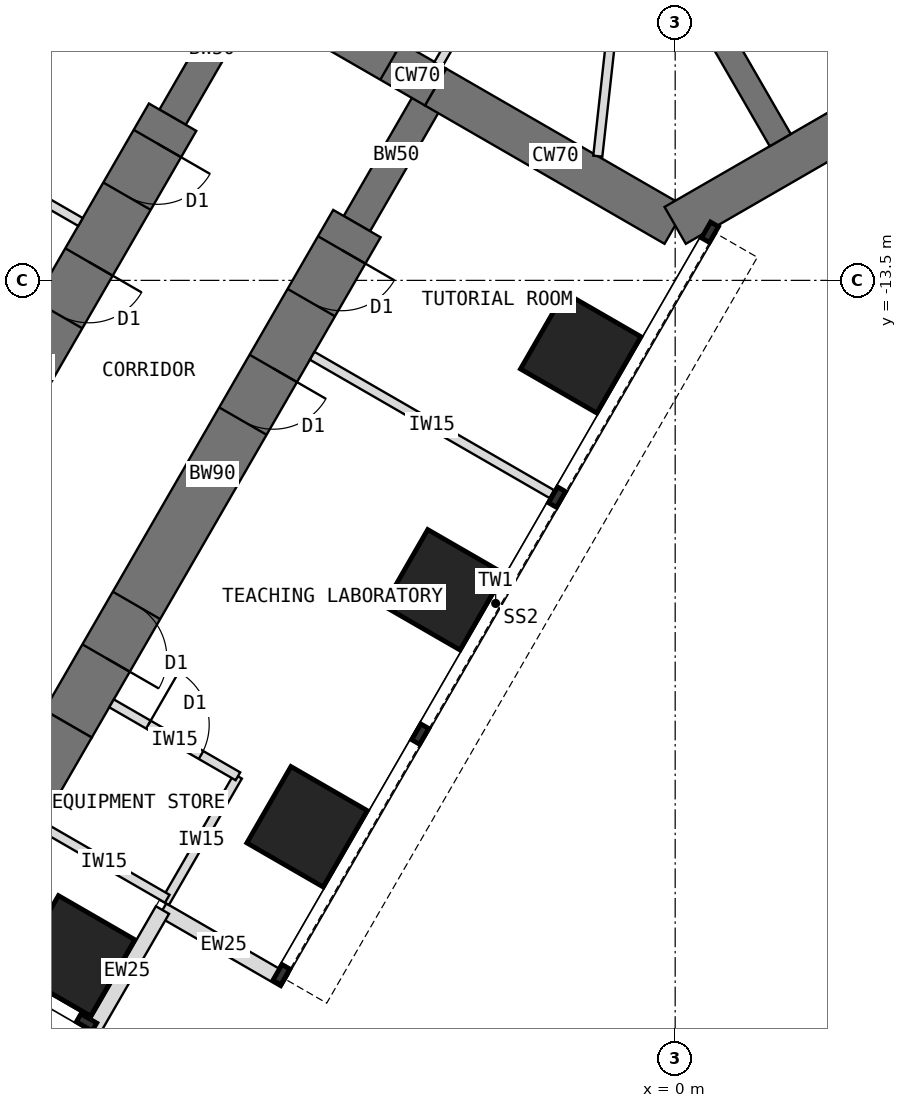
"""IFC4 building model, lengths in metres.
Left out: names, types, materials, properties, quantities, classifications, styles, units other than length and angle.
Written with IfcOpenShell. Run it as: python <this file> out.ifc"""

import sys

from ifc_helpers import new_model, si_unit, direction, frame, frame_2d, origin, origin_2d, place, context, subcontext, project, spatial, rectangle, extrude, element, fill, save


model = new_model("IFC4")
c1 = context("Model", 3, precision=1e-05, world=origin(), true_north=direction((0.0, 1.0)))
c2 = subcontext(c1, "Body", "Model", "MODEL_VIEW")
j1 = project(units=[si_unit("LENGTHUNIT", "METRE"), si_unit("PLANEANGLEUNIT", "RADIAN")], contexts=[c1])
p1 = place(None, origin())
s1 = spatial("IfcSite", under=j1, at=p1, CompositionType="ELEMENT")
p2 = place(p1, origin())
s2 = spatial("IfcBuilding", under=s1, at=p2, CompositionType="ELEMENT")
p3 = place(p2, frame((0.0, 0.0, 48.5)))
s3 = spatial("IfcBuildingStorey", under=s2, at=p3, CompositionType="ELEMENT", Elevation=48.5)
p4 = place(p3, frame((-6.97, -8.572, 0.0), z_axis=(0.0, 0.0, 1.0), x_axis=(0.866019471182, -0.500010275428, 0.0)))
e1 = element("IfcWall", 1, at=p4, inside=s3, PredefinedType="SHEAR", context=c2, shape_type="SweptSolid", body=[
    extrude(rectangle(XDim=3.5, YDim=0.7, at=frame_2d((1.75, 0.0))), origin(), (0.0, 0.0, 1.0), 4.0),
])
p5 = place(p4, frame((0.85, 0.0, 0.0)))
e2 = element("IfcOpeningElement", 2, at=p5, cuts=e1, PredefinedType="OPENING", context=c2, shape_type="SweptSolid", body=[
    extrude(rectangle(XDim=1.8, YDim=2.1, at=frame_2d((0.9, 1.05))), frame((0.0, 0.36, 0.0), z_axis=(0.0, -1.0, 0.0), x_axis=(1.0, 0.0, 0.0)), (0.0, 0.0, 1.0), 0.72),
])
p6 = place(p3, frame((-3.939, -10.322, 0.0), z_axis=(0.0, 0.0, 1.0), x_axis=(0.866011268655, -0.500024481964, 0.0)))
e3 = element("IfcWall", 3, at=p6, inside=s3, PredefinedType="SHEAR", context=c2, shape_type="SweptSolid", body=[
    extrude(rectangle(XDim=4.548, YDim=0.7, at=frame_2d((2.274, 0.0))), origin(), (0.0, 0.0, 1.0), 4.0),
])
p7 = place(p3, frame((0.0, -12.596, 0.0), z_axis=(0.0, 0.0, 1.0), x_axis=(0.866021940709, 0.500005998175, 0.0)))
e4 = element("IfcWall", 4, at=p7, inside=s3, PredefinedType="SHEAR", context=c2, shape_type="SweptSolid", body=[
    extrude(rectangle(XDim=12.596, YDim=0.7, at=frame_2d((6.298, 0.0))), origin(), (0.0, 0.0, 1.0), 4.0),
])
p8 = place(p3, frame((-3.939, -10.322, 0.0), z_axis=(0.0, 0.0, 1.0), x_axis=(-0.499918158782, -0.866072649678, 0.0)))
e5 = element("IfcWall", 5, at=p8, inside=s3, PredefinedType="SHEAR", context=c2, shape_type="SweptSolid", body=[
    extrude(rectangle(XDim=2.592, YDim=0.5, at=frame_2d((1.296, 0.0))), origin(), (0.0, 0.0, 1.0), 4.0),
])
p9 = place(p3, frame((-5.234, -12.566, 0.0), z_axis=(0.0, 0.0, 1.0), x_axis=(-0.499997557548, -0.86602681393, 0.0)))
e6 = element("IfcWall", 6, at=p9, inside=s3, PredefinedType="SHEAR", context=c2, shape_type="SweptSolid", body=[
    extrude(rectangle(XDim=9.5, YDim=0.9, at=frame_2d((4.75, 0.0))), origin(), (0.0, 0.0, 1.0), 4.0),
])
p10 = place(p9, frame((0.5, 0.0, 0.0)))
e7 = element("IfcOpeningElement", 7, at=p10, cuts=e6, PredefinedType="OPENING", context=c2, shape_type="SweptSolid", body=[
    extrude(rectangle(XDim=1.0, YDim=2.1, at=frame_2d((0.5, 1.05))), frame((0.0, 0.46, 0.0), z_axis=(0.0, -1.0, 0.0), x_axis=(1.0, 0.0, 0.0)), (0.0, 0.0, 1.0), 0.92),
])
p11 = place(p9, frame((2.75, 0.0, 0.0)))
e8 = element("IfcOpeningElement", 8, at=p11, cuts=e6, PredefinedType="OPENING", context=c2, shape_type="SweptSolid", body=[
    extrude(rectangle(XDim=1.0, YDim=2.1, at=frame_2d((0.5, 1.05))), frame((0.0, 0.46, 0.0), z_axis=(0.0, -1.0, 0.0), x_axis=(1.0, 0.0, 0.0)), (0.0, 0.0, 1.0), 0.92),
])
p12 = place(p9, frame((7.25, 0.0, 0.0)))
e9 = element("IfcOpeningElement", 9, at=p12, cuts=e6, PredefinedType="OPENING", context=c2, shape_type="SweptSolid", body=[
    extrude(rectangle(XDim=1.0, YDim=2.1, at=frame_2d((0.5, 1.05))), frame((0.0, 0.46, 0.0), z_axis=(0.0, -1.0, 0.0), x_axis=(1.0, 0.0, 0.0)), (0.0, 0.0, 1.0), 0.92),
])
p13 = place(p3, frame((-9.984, -20.794, 0.0), z_axis=(0.0, 0.0, 1.0), x_axis=(-0.500042316284, -0.866000971088, 0.0)))
e10 = element("IfcWall", 10, at=p13, inside=s3, PredefinedType="SHEAR", context=c2, shape_type="SweptSolid", body=[
    extrude(rectangle(XDim=3.7, YDim=0.9, at=frame_2d((1.85, 0.0))), origin(), (0.0, 0.0, 1.0), 4.0),
])
p14 = place(p3, frame((-6.97, -8.572, 0.0), z_axis=(0.0, 0.0, 1.0), x_axis=(-0.499988811324, -0.866031863473, 0.0)))
e11 = element("IfcWall", 11, at=p14, inside=s3, PredefinedType="SHEAR", context=c2, shape_type="SweptSolid", body=[
    extrude(rectangle(XDim=2.592, YDim=0.5, at=frame_2d((1.296, 0.0))), origin(), (0.0, 0.0, 1.0), 4.0),
])
p15 = place(p3, frame((-8.266, -10.816, 0.0), z_axis=(0.0, 0.0, 1.0), x_axis=(-0.499997557548, -0.86602681393, 0.0)))
e12 = element("IfcWall", 12, at=p15, inside=s3, PredefinedType="SHEAR", context=c2, shape_type="SweptSolid", body=[
    extrude(rectangle(XDim=9.5, YDim=0.9, at=frame_2d((4.75, 0.0))), origin(), (0.0, 0.0, 1.0), 4.0),
])
p16 = place(p15, frame((0.5, 0.0, 0.0)))
e13 = element("IfcOpeningElement", 13, at=p16, cuts=e12, PredefinedType="OPENING", context=c2, shape_type="SweptSolid", body=[
    extrude(rectangle(XDim=1.0, YDim=2.1, at=frame_2d((0.5, 1.05))), frame((0.0, 0.46, 0.0), z_axis=(0.0, -1.0, 0.0), x_axis=(1.0, 0.0, 0.0)), (0.0, 0.0, 1.0), 0.92),
])
p17 = place(p15, frame((2.75, 0.0, 0.0)))
e14 = element("IfcOpeningElement", 14, at=p17, cuts=e12, PredefinedType="OPENING", context=c2, shape_type="SweptSolid", body=[
    extrude(rectangle(XDim=1.0, YDim=2.1, at=frame_2d((0.5, 1.05))), frame((0.0, 0.46, 0.0), z_axis=(0.0, -1.0, 0.0), x_axis=(1.0, 0.0, 0.0)), (0.0, 0.0, 1.0), 0.92),
])
p18 = place(p15, frame((7.25, 0.0, 0.0)))
e15 = element("IfcOpeningElement", 15, at=p18, cuts=e12, PredefinedType="OPENING", context=c2, shape_type="SweptSolid", body=[
    extrude(rectangle(XDim=1.0, YDim=2.1, at=frame_2d((0.5, 1.05))), frame((0.0, 0.46, 0.0), z_axis=(0.0, -1.0, 0.0), x_axis=(1.0, 0.0, 0.0)), (0.0, 0.0, 1.0), 0.92),
])
for number, where, z_axis, x_axis in (
    (16, (-1.554, -14.691, 0.0), (0.0, 0.0, 1.0), (0.5, 0.866, 0.0)),
    (17, (-3.804, -18.588, 0.0), (0.0, 0.0, 1.0), (0.5, 0.866, 0.0)),
    (18, (-6.054, -22.486, 0.0), (0.0, 0.0, 1.0), (0.5, 0.866, 0.0)),
    (19, (-9.877, -24.608, 0.0), (0.0, 0.0, 1.0), (0.5, 0.866, 0.0)),
):
    element("IfcColumn", number, at=place(p3, frame(where, z_axis=z_axis, x_axis=x_axis)), inside=s3, PredefinedType="COLUMN", context=c2, shape_type="SweptSolid", body=[
        extrude(rectangle(XDim=1.45, YDim=1.45, at=origin_2d()), origin(), (0.0, 0.0, 1.0), 4.0),
    ])
for number, where, z_axis, x_axis in (
    (20, (-6.419, -25.017, 0.0), (0.0, 0.0, 1.0), (-0.866, 0.5, 0.0)),
    (21, (-8.432, -23.855, 0.0), (0.0, 0.0, 1.0), (-0.5, -0.866, 0.0)),
):
    element("IfcWall", number, at=place(p3, frame(where, z_axis=z_axis, x_axis=x_axis)), inside=s3, PredefinedType="STANDARD", context=c2, shape_type="SweptSolid", body=[
        extrude(rectangle(XDim=2.325, YDim=0.25, at=frame_2d((1.163, 0.0))), origin(), (0.0, 0.0, 1.0), 3.8),
    ])
p19 = place(p3, frame((-1.201, -6.12, 0.0), z_axis=(0.0, 0.0, 1.0), x_axis=(0.500002627198, -0.866023886965, 0.0)))
e22 = element("IfcWall", 22, at=p19, inside=s3, PredefinedType="SHEAR", context=c2, shape_type="SweptSolid", body=[
    extrude(rectangle(XDim=5.858, YDim=0.4, at=frame_2d((2.929, 0.0))), origin(), (0.0, 0.0, 1.0), 4.0),
])
p20 = place(p3, frame((-5.97, -14.74, 0.0), z_axis=(0.0, 0.0, 1.0), x_axis=(0.866035472144, -0.499982560684, 0.0)))
e23 = element("IfcWall", 23, at=p20, inside=s3, PredefinedType="PARTITIONING", context=c2, shape_type="SweptSolid", body=[
    extrude(rectangle(XDim=4.55, YDim=0.15, at=frame_2d((2.275, 0.0))), origin(), (0.0, 0.0, 1.0), 3.8),
])
p21 = place(p3, frame((-7.191, -21.656, 0.0), z_axis=(0.0, 0.0, 1.0), x_axis=(-0.500077600433, -0.865980596518, 0.0)))
e24 = element("IfcWall", 24, at=p21, inside=s3, PredefinedType="PARTITIONING", context=c2, shape_type="SweptSolid", body=[
    extrude(rectangle(XDim=2.4, YDim=0.15, at=frame_2d((1.2, 0.0))), origin(), (0.0, 0.0, 1.0), 3.8),
])
p22 = place(p3, frame((-9.27, -20.456, 0.0), z_axis=(0.0, 0.0, 1.0), x_axis=(0.866006032174, -0.500033551112, 0.0)))
e25 = element("IfcWall", 25, at=p22, inside=s3, PredefinedType="PARTITIONING", context=c2, shape_type="SweptSolid", body=[
    extrude(rectangle(XDim=2.4, YDim=0.15, at=frame_2d((1.2, 0.0))), origin(), (0.0, 0.0, 1.0), 3.8),
])
p23 = place(p22, frame((0.7, 0.0, 0.0)))
e26 = element("IfcOpeningElement", 26, at=p23, cuts=e25, PredefinedType="OPENING", context=c2, shape_type="SweptSolid", body=[
    extrude(rectangle(XDim=1.0, YDim=2.1, at=frame_2d((0.5, 1.05))), frame((0.0, 0.085, 0.0), z_axis=(0.0, -1.0, 0.0), x_axis=(1.0, 0.0, 0.0)), (0.0, 0.0, 1.0), 0.17),
])
p24 = place(p3, frame((-10.432, -22.469, 0.0), z_axis=(0.0, 0.0, 1.0), x_axis=(0.866024647952, -0.500001309137, 0.0)))
e27 = element("IfcWall", 27, at=p24, inside=s3, PredefinedType="PARTITIONING", context=c2, shape_type="SweptSolid", body=[
    extrude(rectangle(XDim=2.4, YDim=0.15, at=frame_2d((1.2, 0.0))), origin(), (0.0, 0.0, 1.0), 3.8),
])
p25 = place(p3, frame((-9.78, -12.54, 0.0), z_axis=(0.0, 0.0, 1.0), x_axis=(-0.866035472144, 0.499982560684, 0.0)))
e28 = element("IfcWall", 28, at=p25, inside=s3, PredefinedType="PARTITIONING", context=c2, shape_type="SweptSolid", body=[
    extrude(rectangle(XDim=4.55, YDim=0.15, at=frame_2d((2.275, 0.0))), origin(), (0.0, 0.0, 1.0), 3.8),
])
p26 = place(p3, frame((-1.664, -6.083, 0.0), z_axis=(0.0, 0.0, 1.0), x_axis=(-0.499999927604, -0.866025445582, 0.0)))
e29 = element("IfcWall", 29, at=p26, inside=s3, PredefinedType="PARTITIONING", context=c2, shape_type="SweptSolid", body=[
    extrude(rectangle(XDim=4.468, YDim=0.15, at=frame_2d((2.234, 0.0))), origin(), (0.0, 0.0, 1.0), 3.8),
])
p27 = place(p26, frame((1.744, 0.0, 0.0)))
e30 = element("IfcOpeningElement", 30, at=p27, cuts=e29, PredefinedType="OPENING", context=c2, shape_type="SweptSolid", body=[
    extrude(rectangle(XDim=1.0, YDim=2.1, at=frame_2d((0.5, 1.05))), frame((0.0, 0.085, 0.0), z_axis=(0.0, -1.0, 0.0), x_axis=(1.0, 0.0, 0.0)), (0.0, 0.0, 1.0), 0.17),
])
p28 = place(p3, frame((-0.764, -6.877, 0.0), z_axis=(0.0, 0.0, 1.0), x_axis=(-0.110408266965, -0.993886318744, 0.0)))
e31 = element("IfcWall", 31, at=p28, inside=s3, PredefinedType="PARTITIONING", context=c2, shape_type="SweptSolid", body=[
    extrude(rectangle(XDim=4.608, YDim=0.15, at=frame_2d((2.304, 0.0))), origin(), (0.0, 0.0, 1.0), 3.8),
])
p29 = place(p28, frame((1.804, 0.0, 0.0)))
e32 = element("IfcOpeningElement", 32, at=p29, cuts=e31, PredefinedType="OPENING", context=c2, shape_type="SweptSolid", body=[
    extrude(rectangle(XDim=1.0, YDim=2.1, at=frame_2d((0.5, 1.05))), frame((0.0, 0.085, 0.0), z_axis=(0.0, -1.0, 0.0), x_axis=(1.0, 0.0, 0.0)), (0.0, 0.0, 1.0), 0.17),
])
p30 = place(p5, origin())
e33 = element("IfcDoor", 33, at=p30, inside=s3, OperationType="DOUBLE_DOOR_DOUBLE_SWING", PredefinedType="DOOR", context=c2, shape_type="SweptSolid", body=[
    extrude(rectangle(XDim=1.72, YDim=2.06, at=frame_2d((0.9, 1.03))), frame((0.0, 0.025, 0.0), z_axis=(0.0, -1.0, 0.0), x_axis=(1.0, 0.0, 0.0)), (0.0, 0.0, 1.0), 0.05),
    extrude(rectangle(XDim=0.04, YDim=2.1, at=frame_2d((0.02, 1.05))), frame((0.0, 0.35, 0.0), z_axis=(0.0, -1.0, 0.0), x_axis=(1.0, 0.0, 0.0)), (0.0, 0.0, 1.0), 0.699),
    extrude(rectangle(XDim=0.04, YDim=2.1, at=frame_2d((1.78, 1.05))), frame((0.0, 0.35, 0.0), z_axis=(0.0, -1.0, 0.0), x_axis=(1.0, 0.0, 0.0)), (0.0, 0.0, 1.0), 0.699),
    extrude(rectangle(XDim=1.72, YDim=0.04, at=frame_2d((0.9, 2.08))), frame((0.0, 0.35, 0.0), z_axis=(0.0, -1.0, 0.0), x_axis=(1.0, 0.0, 0.0)), (0.0, 0.0, 1.0), 0.699),
])
fill(e2, e33)
p31 = place(p23, origin())
e34 = element("IfcDoor", 34, at=p31, inside=s3, OperationType="SINGLE_SWING_LEFT", PredefinedType="DOOR", context=c2, shape_type="SweptSolid", body=[
    extrude(rectangle(XDim=1.0, YDim=2.1, at=frame_2d((0.5, 1.05))), frame((0.0, 0.025, 0.0), z_axis=(0.0, -1.0, 0.0), x_axis=(1.0, 0.0, 0.0)), (0.0, 0.0, 1.0), 0.05),
])
fill(e26, e34)
p32 = place(p10, origin())
e35 = element("IfcDoor", 35, at=p32, inside=s3, OperationType="SINGLE_SWING_LEFT", PredefinedType="DOOR", context=c2, shape_type="SweptSolid", body=[
    extrude(rectangle(XDim=0.92, YDim=2.06, at=frame_2d((0.5, 1.03))), frame((0.0, 0.025, 0.0), z_axis=(0.0, -1.0, 0.0), x_axis=(1.0, 0.0, 0.0)), (0.0, 0.0, 1.0), 0.05),
    extrude(rectangle(XDim=0.04, YDim=2.1, at=frame_2d((0.02, 1.05))), frame((0.0, 0.45, 0.0), z_axis=(0.0, -1.0, 0.0), x_axis=(1.0, 0.0, 0.0)), (0.0, 0.0, 1.0), 0.899),
    extrude(rectangle(XDim=0.04, YDim=2.1, at=frame_2d((0.98, 1.05))), frame((0.0, 0.45, 0.0), z_axis=(0.0, -1.0, 0.0), x_axis=(1.0, 0.0, 0.0)), (0.0, 0.0, 1.0), 0.899),
    extrude(rectangle(XDim=0.92, YDim=0.04, at=frame_2d((0.5, 2.08))), frame((0.0, 0.45, 0.0), z_axis=(0.0, -1.0, 0.0), x_axis=(1.0, 0.0, 0.0)), (0.0, 0.0, 1.0), 0.899),
])
fill(e7, e35)
p33 = place(p11, origin())
e36 = element("IfcDoor", 36, at=p33, inside=s3, OperationType="SINGLE_SWING_LEFT", PredefinedType="DOOR", context=c2, shape_type="SweptSolid", body=[
    extrude(rectangle(XDim=0.92, YDim=2.06, at=frame_2d((0.5, 1.03))), frame((0.0, 0.025, 0.0), z_axis=(0.0, -1.0, 0.0), x_axis=(1.0, 0.0, 0.0)), (0.0, 0.0, 1.0), 0.05),
    extrude(rectangle(XDim=0.04, YDim=2.1, at=frame_2d((0.02, 1.05))), frame((0.0, 0.45, 0.0), z_axis=(0.0, -1.0, 0.0), x_axis=(1.0, 0.0, 0.0)), (0.0, 0.0, 1.0), 0.899),
    extrude(rectangle(XDim=0.04, YDim=2.1, at=frame_2d((0.98, 1.05))), frame((0.0, 0.45, 0.0), z_axis=(0.0, -1.0, 0.0), x_axis=(1.0, 0.0, 0.0)), (0.0, 0.0, 1.0), 0.899),
    extrude(rectangle(XDim=0.92, YDim=0.04, at=frame_2d((0.5, 2.08))), frame((0.0, 0.45, 0.0), z_axis=(0.0, -1.0, 0.0), x_axis=(1.0, 0.0, 0.0)), (0.0, 0.0, 1.0), 0.899),
])
fill(e8, e36)
p34 = place(p12, origin())
e37 = element("IfcDoor", 37, at=p34, inside=s3, OperationType="SINGLE_SWING_RIGHT", PredefinedType="DOOR", context=c2, shape_type="SweptSolid", body=[
    extrude(rectangle(XDim=0.92, YDim=2.06, at=frame_2d((0.5, 1.03))), frame((0.0, 0.025, 0.0), z_axis=(0.0, -1.0, 0.0), x_axis=(1.0, 0.0, 0.0)), (0.0, 0.0, 1.0), 0.05),
    extrude(rectangle(XDim=0.04, YDim=2.1, at=frame_2d((0.02, 1.05))), frame((0.0, 0.45, 0.0), z_axis=(0.0, -1.0, 0.0), x_axis=(1.0, 0.0, 0.0)), (0.0, 0.0, 1.0), 0.899),
    extrude(rectangle(XDim=0.04, YDim=2.1, at=frame_2d((0.98, 1.05))), frame((0.0, 0.45, 0.0), z_axis=(0.0, -1.0, 0.0), x_axis=(1.0, 0.0, 0.0)), (0.0, 0.0, 1.0), 0.899),
    extrude(rectangle(XDim=0.92, YDim=0.04, at=frame_2d((0.5, 2.08))), frame((0.0, 0.45, 0.0), z_axis=(0.0, -1.0, 0.0), x_axis=(1.0, 0.0, 0.0)), (0.0, 0.0, 1.0), 0.899),
])
fill(e9, e37)
p35 = place(p16, origin())
e38 = element("IfcDoor", 38, at=p35, inside=s3, OperationType="SINGLE_SWING_LEFT", PredefinedType="DOOR", context=c2, shape_type="SweptSolid", body=[
    extrude(rectangle(XDim=0.92, YDim=2.06, at=frame_2d((0.5, 1.03))), frame((0.0, 0.025, 0.0), z_axis=(0.0, -1.0, 0.0), x_axis=(1.0, 0.0, 0.0)), (0.0, 0.0, 1.0), 0.05),
    extrude(rectangle(XDim=0.04, YDim=2.1, at=frame_2d((0.02, 1.05))), frame((0.0, 0.45, 0.0), z_axis=(0.0, -1.0, 0.0), x_axis=(1.0, 0.0, 0.0)), (0.0, 0.0, 1.0), 0.899),
    extrude(rectangle(XDim=0.04, YDim=2.1, at=frame_2d((0.98, 1.05))), frame((0.0, 0.45, 0.0), z_axis=(0.0, -1.0, 0.0), x_axis=(1.0, 0.0, 0.0)), (0.0, 0.0, 1.0), 0.899),
    extrude(rectangle(XDim=0.92, YDim=0.04, at=frame_2d((0.5, 2.08))), frame((0.0, 0.45, 0.0), z_axis=(0.0, -1.0, 0.0), x_axis=(1.0, 0.0, 0.0)), (0.0, 0.0, 1.0), 0.899),
])
fill(e13, e38)
p36 = place(p17, origin())
e39 = element("IfcDoor", 39, at=p36, inside=s3, OperationType="SINGLE_SWING_LEFT", PredefinedType="DOOR", context=c2, shape_type="SweptSolid", body=[
    extrude(rectangle(XDim=0.92, YDim=2.06, at=frame_2d((0.5, 1.03))), frame((0.0, 0.025, 0.0), z_axis=(0.0, -1.0, 0.0), x_axis=(1.0, 0.0, 0.0)), (0.0, 0.0, 1.0), 0.05),
    extrude(rectangle(XDim=0.04, YDim=2.1, at=frame_2d((0.02, 1.05))), frame((0.0, 0.45, 0.0), z_axis=(0.0, -1.0, 0.0), x_axis=(1.0, 0.0, 0.0)), (0.0, 0.0, 1.0), 0.899),
    extrude(rectangle(XDim=0.04, YDim=2.1, at=frame_2d((0.98, 1.05))), frame((0.0, 0.45, 0.0), z_axis=(0.0, -1.0, 0.0), x_axis=(1.0, 0.0, 0.0)), (0.0, 0.0, 1.0), 0.899),
    extrude(rectangle(XDim=0.92, YDim=0.04, at=frame_2d((0.5, 2.08))), frame((0.0, 0.45, 0.0), z_axis=(0.0, -1.0, 0.0), x_axis=(1.0, 0.0, 0.0)), (0.0, 0.0, 1.0), 0.899),
])
fill(e14, e39)
save(model, sys.argv[1])
